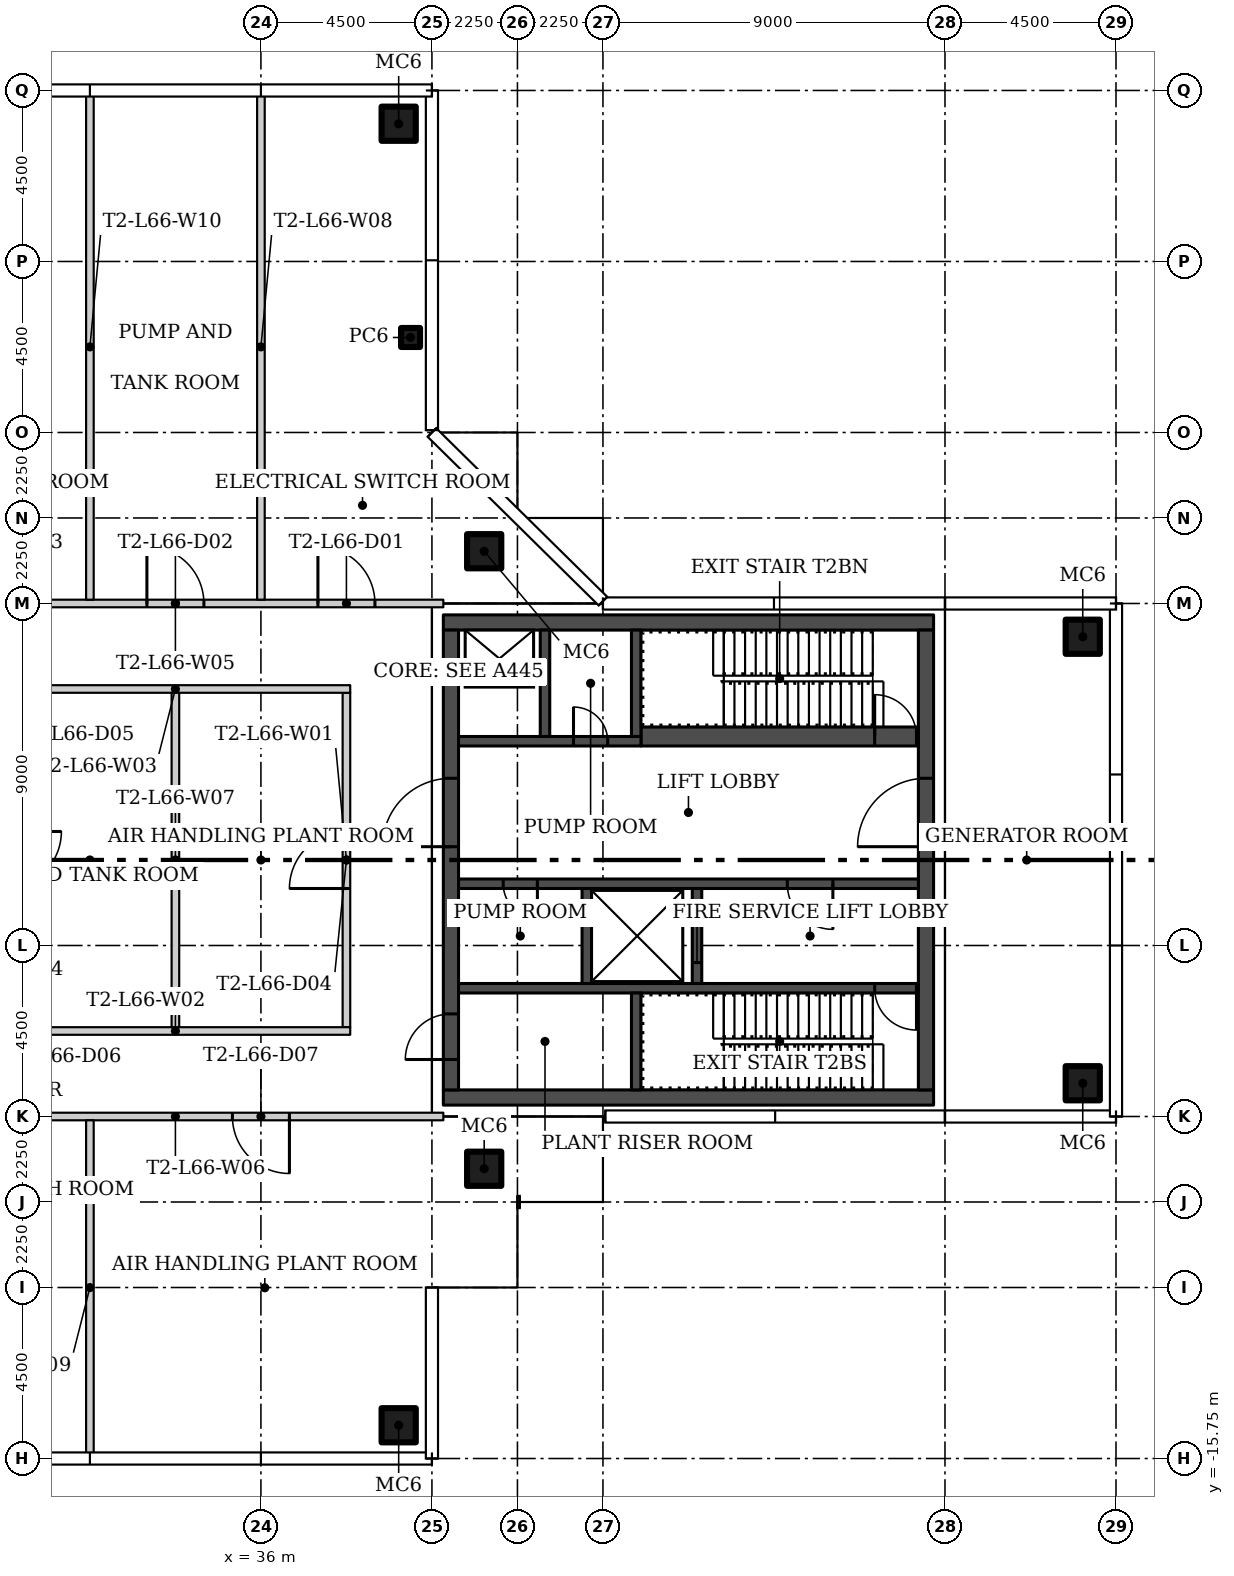
"""IFC4 building model, lengths in metres.
Left out: names, types, materials, properties, quantities, classifications, styles, units other than length and angle.
Written with IfcOpenShell. Run it as: python <this file> out.ifc"""

import sys

from ifc_helpers import new_model, si_unit, direction, frame, frame_2d, origin, origin_2d, place, context, subcontext, project, spatial, rectangle, hollow_rectangle, extrude, element, fill, save


model = new_model("IFC4")
c1 = context("Model", 3, precision=1e-05, world=origin(), true_north=direction((0.0, 1.0)))
c2 = subcontext(c1, "Body", "Model", "MODEL_VIEW")
j1 = project(units=[si_unit("LENGTHUNIT", "METRE"), si_unit("PLANEANGLEUNIT", "RADIAN")], contexts=[c1])
p1 = place(None, origin())
s1 = spatial("IfcSite", under=j1, at=p1, CompositionType="ELEMENT")
p2 = place(p1, origin())
s2 = spatial("IfcBuilding", under=s1, at=p2, CompositionType="ELEMENT")
p3 = place(p2, frame((0.0, 0.0, 273.3)))
s3 = spatial("IfcBuildingStorey", under=s2, at=p3, CompositionType="ELEMENT", Elevation=273.3)
for number, where in (
    (1, (41.875, 8.125, 0.0)),
    (2, (41.875, -8.125, 0.0)),
):
    element("IfcColumn", number, at=place(p3, frame(where)), inside=s3, PredefinedType="COLUMN", context=c2, shape_type="SweptSolid", body=[
        extrude(hollow_rectangle(XDim=0.9, YDim=0.9, WallThickness=0.036, at=origin_2d()), origin(), (0.0, 0.0, 1.0), 4.55),
    ])
p4 = place(p3, frame((39.938, 13.75, 0.0)))
e3 = element("IfcColumn", 3, at=p4, inside=s3, PredefinedType="COLUMN", context=c2, shape_type="SweptSolid", body=[
    extrude(hollow_rectangle(XDim=0.5, YDim=0.5, WallThickness=0.016, at=origin_2d()), origin(), (0.0, 0.0, 1.0), 4.55),
])
for number, where in (
    (4, (39.625, 19.375, 0.0)),
    (5, (39.625, -14.875, 0.0)),
    (6, (57.625, -5.875, 0.0)),
    (7, (57.625, 5.875, 0.0)),
):
    element("IfcColumn", number, at=place(p3, frame(where)), inside=s3, PredefinedType="COLUMN", context=c2, shape_type="SweptSolid", body=[
        extrude(hollow_rectangle(XDim=0.9, YDim=0.9, WallThickness=0.036, at=origin_2d()), origin(), (0.0, 0.0, 1.0), 4.55),
    ])
p5 = place(p3, frame((38.25, -4.4, 0.0), z_axis=(0.0, 0.0, 1.0), x_axis=(0.0, 1.0, 0.0)))
e8 = element("IfcWall", 8, at=p5, inside=s3, PredefinedType="PARTITIONING", context=c2, shape_type="SweptSolid", body=[
    extrude(rectangle(XDim=8.8, YDim=0.2, at=frame_2d((4.4, 0.0))), origin(), (0.0, 0.0, 1.0), 4.55),
])
p6 = place(p5, frame((3.65, 0.0, 0.0)))
e9 = element("IfcOpeningElement", 9, at=p6, cuts=e8, PredefinedType="OPENING", context=c2, shape_type="SweptSolid", body=[
    extrude(rectangle(XDim=1.5, YDim=2.4, at=frame_2d((0.75, 1.2))), frame((0.0, 0.11, 0.0), z_axis=(0.0, -1.0, 0.0), x_axis=(1.0, 0.0, 0.0)), (0.0, 0.0, 1.0), 0.22),
])
p7 = place(p3, frame((29.15, -4.5, 0.0)))
e10 = element("IfcWall", 10, at=p7, inside=s3, PredefinedType="PARTITIONING", context=c2, shape_type="SweptSolid", body=[
    extrude(rectangle(XDim=9.2, YDim=0.2, at=frame_2d((4.6, 0.0))), origin(), (0.0, 0.0, 1.0), 4.55),
])
p8 = place(p3, frame((38.35, 4.5, 0.0), z_axis=(0.0, 0.0, 1.0), x_axis=(-1.0, 0.0, 0.0)))
e11 = element("IfcWall", 11, at=p8, inside=s3, PredefinedType="PARTITIONING", context=c2, shape_type="SweptSolid", body=[
    extrude(rectangle(XDim=9.2, YDim=0.2, at=frame_2d((4.6, 0.0))), origin(), (0.0, 0.0, 1.0), 4.55),
])
p9 = place(p3, frame((26.7, 6.75, 0.0)))
e12 = element("IfcWall", 12, at=p9, inside=s3, PredefinedType="PARTITIONING", context=c2, shape_type="SweptSolid", body=[
    extrude(rectangle(XDim=14.1, YDim=0.2, at=frame_2d((7.05, 0.0))), origin(), (0.0, 0.0, 1.0), 4.55),
])
p10 = place(p9, frame((10.8, 0.0, 0.0)))
e13 = element("IfcOpeningElement", 13, at=p10, cuts=e12, PredefinedType="OPENING", context=c2, shape_type="SweptSolid", body=[
    extrude(rectangle(XDim=1.5, YDim=2.4, at=frame_2d((0.75, 1.2))), frame((0.0, 0.11, 0.0), z_axis=(0.0, -1.0, 0.0), x_axis=(1.0, 0.0, 0.0)), (0.0, 0.0, 1.0), 0.22),
])
p11 = place(p9, frame((6.3, 0.0, 0.0)))
e14 = element("IfcOpeningElement", 14, at=p11, cuts=e12, PredefinedType="OPENING", context=c2, shape_type="SweptSolid", body=[
    extrude(rectangle(XDim=1.5, YDim=2.4, at=frame_2d((0.75, 1.2))), frame((0.0, 0.11, 0.0), z_axis=(0.0, -1.0, 0.0), x_axis=(1.0, 0.0, 0.0)), (0.0, 0.0, 1.0), 0.22),
])
p12 = place(p9, frame((1.8, 0.0, 0.0)))
e15 = element("IfcOpeningElement", 15, at=p12, cuts=e12, PredefinedType="OPENING", context=c2, shape_type="SweptSolid", body=[
    extrude(rectangle(XDim=1.5, YDim=2.4, at=frame_2d((0.75, 1.2))), frame((0.0, 0.11, 0.0), z_axis=(0.0, -1.0, 0.0), x_axis=(1.0, 0.0, 0.0)), (0.0, 0.0, 1.0), 0.22),
])
p13 = place(p3, frame((40.8, -6.75, 0.0), z_axis=(0.0, 0.0, 1.0), x_axis=(-1.0, 0.0, 0.0)))
e16 = element("IfcWall", 16, at=p13, inside=s3, PredefinedType="PARTITIONING", context=c2, shape_type="SweptSolid", body=[
    extrude(rectangle(XDim=14.1, YDim=0.2, at=frame_2d((7.05, 0.0))), origin(), (0.0, 0.0, 1.0), 4.55),
])
p14 = place(p13, frame((10.8, 0.0, 0.0)))
e17 = element("IfcOpeningElement", 17, at=p14, cuts=e16, PredefinedType="OPENING", context=c2, shape_type="SweptSolid", body=[
    extrude(rectangle(XDim=1.5, YDim=2.4, at=frame_2d((0.75, 1.2))), frame((0.0, 0.11, 0.0), z_axis=(0.0, -1.0, 0.0), x_axis=(1.0, 0.0, 0.0)), (0.0, 0.0, 1.0), 0.22),
])
p15 = place(p13, frame((4.05, 0.0, 0.0)))
e18 = element("IfcOpeningElement", 18, at=p15, cuts=e16, PredefinedType="OPENING", context=c2, shape_type="SweptSolid", body=[
    extrude(rectangle(XDim=1.5, YDim=2.4, at=frame_2d((0.75, 1.2))), frame((0.0, 0.11, 0.0), z_axis=(0.0, -1.0, 0.0), x_axis=(1.0, 0.0, 0.0)), (0.0, 0.0, 1.0), 0.22),
])
p16 = place(p3, frame((33.75, 4.4, 0.0), z_axis=(0.0, 0.0, 1.0), x_axis=(0.0, -1.0, 0.0)))
e19 = element("IfcWall", 19, at=p16, inside=s3, PredefinedType="PARTITIONING", context=c2, shape_type="SweptSolid", body=[
    extrude(rectangle(XDim=8.8, YDim=0.2, at=frame_2d((4.4, 0.0))), origin(), (0.0, 0.0, 1.0), 4.55),
])
p17 = place(p3, frame((36.0, 20.155, 0.0), z_axis=(0.0, 0.0, 1.0), x_axis=(0.0, -1.0, 0.0)))
e20 = element("IfcWall", 20, at=p17, inside=s3, PredefinedType="PARTITIONING", context=c2, shape_type="SweptSolid", body=[
    extrude(rectangle(XDim=13.305, YDim=0.2, at=frame_2d((6.652, 0.0))), origin(), (0.0, 0.0, 1.0), 4.55),
])
p18 = place(p3, frame((31.5, -6.85, 0.0), z_axis=(0.0, 0.0, 1.0), x_axis=(0.0, -1.0, 0.0)))
e21 = element("IfcWall", 21, at=p18, inside=s3, PredefinedType="PARTITIONING", context=c2, shape_type="SweptSolid", body=[
    extrude(rectangle(XDim=8.805, YDim=0.2, at=frame_2d((4.402, 0.0))), origin(), (0.0, 0.0, 1.0), 4.55),
])
p19 = place(p3, frame((31.5, 20.155, 0.0), z_axis=(0.0, 0.0, 1.0), x_axis=(0.0, -1.0, 0.0)))
e22 = element("IfcWall", 22, at=p19, inside=s3, PredefinedType="PARTITIONING", context=c2, shape_type="SweptSolid", body=[
    extrude(rectangle(XDim=13.305, YDim=0.2, at=frame_2d((6.652, 0.0))), origin(), (0.0, 0.0, 1.0), 4.55),
])
for number, where, z_axis, x_axis in (
    (23, (53.7, -6.25, 0.0), (0.0, 0.0, 1.0), (-1.0, 0.0, 0.0)),
    (24, (53.7, 6.25, 0.0), (0.0, 0.0, 1.0), (-1.0, 0.0, 0.0)),
):
    element("IfcWall", number, at=place(p3, frame(where, z_axis=z_axis, x_axis=x_axis)), inside=s3, PredefinedType="SHEAR", context=c2, shape_type="SweptSolid", body=[
        extrude(rectangle(XDim=12.9, YDim=0.4, at=frame_2d((6.45, 0.0))), origin(), (0.0, 0.0, 1.0), 4.55),
    ])
p20 = place(p3, frame((53.5, -6.05, 0.0), z_axis=(0.0, 0.0, 1.0), x_axis=(0.0, 1.0, 0.0)))
e25 = element("IfcWall", 25, at=p20, inside=s3, PredefinedType="SHEAR", context=c2, shape_type="SweptSolid", body=[
    extrude(rectangle(XDim=12.1, YDim=0.4, at=frame_2d((6.05, 0.0))), origin(), (0.0, 0.0, 1.0), 4.55),
])
p21 = place(p20, frame((6.4, 0.0, 0.0)))
e26 = element("IfcOpeningElement", 26, at=p21, cuts=e25, PredefinedType="OPENING", context=c2, shape_type="SweptSolid", body=[
    extrude(rectangle(XDim=1.8, YDim=2.4, at=frame_2d((0.9, 1.2))), frame((0.0, 0.21, 0.0), z_axis=(0.0, -1.0, 0.0), x_axis=(1.0, 0.0, 0.0)), (0.0, 0.0, 1.0), 0.42),
])
p22 = place(p3, frame((41.0, -6.05, 0.0), z_axis=(0.0, 0.0, 1.0), x_axis=(0.0, 1.0, 0.0)))
e27 = element("IfcWall", 27, at=p22, inside=s3, PredefinedType="SHEAR", context=c2, shape_type="SweptSolid", body=[
    extrude(rectangle(XDim=12.1, YDim=0.4, at=frame_2d((6.05, 0.0))), origin(), (0.0, 0.0, 1.0), 4.55),
])
p23 = place(p22, frame((0.8, 0.0, 0.0)))
e28 = element("IfcOpeningElement", 28, at=p23, cuts=e27, PredefinedType="OPENING", context=c2, shape_type="SweptSolid", body=[
    extrude(rectangle(XDim=1.2, YDim=2.1, at=frame_2d((0.6, 1.05))), frame((0.0, 0.21, 0.0), z_axis=(0.0, -1.0, 0.0), x_axis=(1.0, 0.0, 0.0)), (0.0, 0.0, 1.0), 0.42),
])
p24 = place(p22, frame((6.4, 0.0, 0.0)))
e29 = element("IfcOpeningElement", 29, at=p24, cuts=e27, PredefinedType="OPENING", context=c2, shape_type="SweptSolid", body=[
    extrude(rectangle(XDim=1.8, YDim=2.4, at=frame_2d((0.9, 1.2))), frame((0.0, 0.21, 0.0), z_axis=(0.0, -1.0, 0.0), x_axis=(1.0, 0.0, 0.0)), (0.0, 0.0, 1.0), 0.42),
])
p25 = place(p3, frame((53.3, -3.375, 0.0), z_axis=(0.0, 0.0, 1.0), x_axis=(-1.0, 0.0, 0.0)))
e30 = element("IfcWall", 30, at=p25, inside=s3, PredefinedType="SHEAR", context=c2, shape_type="SweptSolid", body=[
    extrude(rectangle(XDim=12.1, YDim=0.25, at=frame_2d((6.05, 0.0))), origin(), (0.0, 0.0, 1.0), 4.55),
])
p26 = place(p25, frame((0.05, 0.0, 0.0)))
e31 = element("IfcOpeningElement", 31, at=p26, cuts=e30, PredefinedType="OPENING", context=c2, shape_type="SweptSolid", body=[
    extrude(rectangle(XDim=1.1, YDim=2.1, at=frame_2d((0.55, 1.05))), frame((0.0, 0.135, 0.0), z_axis=(0.0, -1.0, 0.0), x_axis=(1.0, 0.0, 0.0)), (0.0, 0.0, 1.0), 0.27),
])
p27 = place(p3, frame((45.875, -6.05, 0.0), z_axis=(0.0, 0.0, 1.0), x_axis=(0.0, 1.0, 0.0)))
e32 = element("IfcWall", 32, at=p27, inside=s3, PredefinedType="SHEAR", context=c2, shape_type="SweptSolid", body=[
    extrude(rectangle(XDim=2.55, YDim=0.25, at=frame_2d((1.275, 0.0))), origin(), (0.0, 0.0, 1.0), 4.55),
])
p28 = place(p3, frame((53.3, -0.625, 0.0), z_axis=(0.0, 0.0, 1.0), x_axis=(-1.0, 0.0, 0.0)))
e33 = element("IfcWall", 33, at=p28, inside=s3, PredefinedType="SHEAR", context=c2, shape_type="SweptSolid", body=[
    extrude(rectangle(XDim=12.1, YDim=0.25, at=frame_2d((6.05, 0.0))), origin(), (0.0, 0.0, 1.0), 4.55),
])
p29 = place(p28, frame((2.25, 0.0, 0.0)))
e34 = element("IfcOpeningElement", 34, at=p29, cuts=e33, PredefinedType="OPENING", context=c2, shape_type="SweptSolid", body=[
    extrude(rectangle(XDim=1.2, YDim=2.1, at=frame_2d((0.6, 1.05))), frame((0.0, 0.135, 0.0), z_axis=(0.0, -1.0, 0.0), x_axis=(1.0, 0.0, 0.0)), (0.0, 0.0, 1.0), 0.27),
])
p30 = place(p28, frame((10.025, 0.0, 0.0)))
e35 = element("IfcOpeningElement", 35, at=p30, cuts=e33, PredefinedType="OPENING", context=c2, shape_type="SweptSolid", body=[
    extrude(rectangle(XDim=0.9, YDim=2.1, at=frame_2d((0.45, 1.05))), frame((0.0, 0.135, 0.0), z_axis=(0.0, -1.0, 0.0), x_axis=(1.0, 0.0, 0.0)), (0.0, 0.0, 1.0), 0.27),
])
p31 = place(p3, frame((47.475, -3.25, 0.0), z_axis=(0.0, 0.0, 1.0), x_axis=(0.0, 1.0, 0.0)))
e36 = element("IfcWall", 36, at=p31, inside=s3, PredefinedType="SHEAR", context=c2, shape_type="SweptSolid", body=[
    extrude(rectangle(XDim=2.5, YDim=0.25, at=frame_2d((1.25, 0.0))), origin(), (0.0, 0.0, 1.0), 4.55),
])
p32 = place(p31, frame((0.55, 0.0, 0.0)))
e37 = element("IfcOpeningElement", 37, at=p32, cuts=e36, PredefinedType="OPENING", context=c2, shape_type="SweptSolid", body=[
    extrude(rectangle(XDim=1.4, YDim=2.4, at=frame_2d((0.7, 1.2))), frame((0.0, 0.135, 0.0), z_axis=(0.0, -1.0, 0.0), x_axis=(1.0, 0.0, 0.0)), (0.0, 0.0, 1.0), 0.27),
])
p33 = place(p3, frame((44.575, -3.25, 0.0), z_axis=(0.0, 0.0, 1.0), x_axis=(0.0, 1.0, 0.0)))
e38 = element("IfcWall", 38, at=p33, inside=s3, PredefinedType="SHEAR", context=c2, shape_type="SweptSolid", body=[
    extrude(rectangle(XDim=2.5, YDim=0.25, at=frame_2d((1.25, 0.0))), origin(), (0.0, 0.0, 1.0), 4.55),
])
p34 = place(p3, frame((46.0, 3.25, 0.0)))
e39 = element("IfcWall", 39, at=p34, inside=s3, PredefinedType="SHEAR", context=c2, shape_type="SweptSolid", body=[
    extrude(rectangle(XDim=7.3, YDim=0.5, at=frame_2d((3.65, 0.0))), origin(), (0.0, 0.0, 1.0), 4.55),
])
p35 = place(p34, frame((6.15, 0.0, 0.0)))
e40 = element("IfcOpeningElement", 40, at=p35, cuts=e39, PredefinedType="OPENING", context=c2, shape_type="SweptSolid", body=[
    extrude(rectangle(XDim=1.1, YDim=2.1, at=frame_2d((0.55, 1.05))), frame((0.0, 0.26, 0.0), z_axis=(0.0, -1.0, 0.0), x_axis=(1.0, 0.0, 0.0)), (0.0, 0.0, 1.0), 0.52),
])
p36 = place(p3, frame((41.2, 3.125, 0.0)))
e41 = element("IfcWall", 41, at=p36, inside=s3, PredefinedType="SHEAR", context=c2, shape_type="SweptSolid", body=[
    extrude(rectangle(XDim=4.8, YDim=0.25, at=frame_2d((2.4, 0.0))), origin(), (0.0, 0.0, 1.0), 4.55),
])
p37 = place(p36, frame((3.025, 0.0, 0.0)))
e42 = element("IfcOpeningElement", 42, at=p37, cuts=e41, PredefinedType="OPENING", context=c2, shape_type="SweptSolid", body=[
    extrude(rectangle(XDim=0.9, YDim=2.1, at=frame_2d((0.45, 1.05))), frame((0.0, 0.135, 0.0), z_axis=(0.0, -1.0, 0.0), x_axis=(1.0, 0.0, 0.0)), (0.0, 0.0, 1.0), 0.27),
])
for number, where, z_axis, x_axis in (
    (43, (45.875, 3.25, 0.0), (0.0, 0.0, 1.0), (0.0, 1.0, 0.0)),
    (44, (43.475, 3.25, 0.0), (0.0, 0.0, 1.0), (0.0, 1.0, 0.0)),
):
    element("IfcWall", number, at=place(p3, frame(where, z_axis=z_axis, x_axis=x_axis)), inside=s3, PredefinedType="SHEAR", context=c2, shape_type="SweptSolid", body=[
        extrude(rectangle(XDim=2.8, YDim=0.25, at=frame_2d((1.4, 0.0))), origin(), (0.0, 0.0, 1.0), 4.55),
    ])
p38 = place(p10, origin())
e45 = element("IfcDoor", 45, at=p38, inside=s3, OperationType="DOUBLE_DOOR_SINGLE_SWING", PredefinedType="DOOR", context=c2, shape_type="SweptSolid", body=[
    extrude(rectangle(XDim=1.5, YDim=2.4, at=frame_2d((0.75, 1.2))), frame((0.0, 0.025, 0.0), z_axis=(0.0, -1.0, 0.0), x_axis=(1.0, 0.0, 0.0)), (0.0, 0.0, 1.0), 0.05),
])
fill(e13, e45)
p39 = place(p11, origin())
e46 = element("IfcDoor", 46, at=p39, inside=s3, OperationType="DOUBLE_DOOR_SINGLE_SWING", PredefinedType="DOOR", context=c2, shape_type="SweptSolid", body=[
    extrude(rectangle(XDim=1.5, YDim=2.4, at=frame_2d((0.75, 1.2))), frame((0.0, 0.025, 0.0), z_axis=(0.0, -1.0, 0.0), x_axis=(1.0, 0.0, 0.0)), (0.0, 0.0, 1.0), 0.05),
])
fill(e14, e46)
p40 = place(p6, origin())
e47 = element("IfcDoor", 47, at=p40, inside=s3, OperationType="DOUBLE_DOOR_SINGLE_SWING", PredefinedType="DOOR", context=c2, shape_type="SweptSolid", body=[
    extrude(rectangle(XDim=1.5, YDim=2.4, at=frame_2d((0.75, 1.2))), frame((0.0, 0.025, 0.0), z_axis=(0.0, -1.0, 0.0), x_axis=(1.0, 0.0, 0.0)), (0.0, 0.0, 1.0), 0.05),
])
fill(e9, e47)
p41 = place(p15, origin())
e48 = element("IfcDoor", 48, at=p41, inside=s3, OperationType="DOUBLE_DOOR_SINGLE_SWING", PredefinedType="DOOR", context=c2, shape_type="SweptSolid", body=[
    extrude(rectangle(XDim=1.5, YDim=2.4, at=frame_2d((0.75, 1.2))), frame((0.0, 0.025, 0.0), z_axis=(0.0, -1.0, 0.0), x_axis=(1.0, 0.0, 0.0)), (0.0, 0.0, 1.0), 0.05),
])
fill(e18, e48)
p42 = place(p21, origin())
e49 = element("IfcDoor", 49, at=p42, inside=s3, OperationType="DOUBLE_DOOR_SINGLE_SWING", PredefinedType="DOOR", context=c2, shape_type="SweptSolid", body=[
    extrude(rectangle(XDim=1.8, YDim=2.4, at=frame_2d((0.9, 1.2))), frame((0.0, 0.025, 0.0), z_axis=(0.0, -1.0, 0.0), x_axis=(1.0, 0.0, 0.0)), (0.0, 0.0, 1.0), 0.05),
])
fill(e26, e49)
p43 = place(p23, origin())
e50 = element("IfcDoor", 50, at=p43, inside=s3, OperationType="SINGLE_SWING_LEFT", PredefinedType="DOOR", context=c2, shape_type="SweptSolid", body=[
    extrude(rectangle(XDim=1.2, YDim=2.1, at=frame_2d((0.6, 1.05))), frame((0.0, 0.025, 0.0), z_axis=(0.0, -1.0, 0.0), x_axis=(1.0, 0.0, 0.0)), (0.0, 0.0, 1.0), 0.05),
])
fill(e28, e50)
p44 = place(p24, origin())
e51 = element("IfcDoor", 51, at=p44, inside=s3, OperationType="DOUBLE_DOOR_SINGLE_SWING", PredefinedType="DOOR", context=c2, shape_type="SweptSolid", body=[
    extrude(rectangle(XDim=1.8, YDim=2.4, at=frame_2d((0.9, 1.2))), frame((0.0, 0.025, 0.0), z_axis=(0.0, -1.0, 0.0), x_axis=(1.0, 0.0, 0.0)), (0.0, 0.0, 1.0), 0.05),
])
fill(e29, e51)
p45 = place(p26, origin())
e52 = element("IfcDoor", 52, at=p45, inside=s3, OperationType="SINGLE_SWING_LEFT", PredefinedType="DOOR", context=c2, shape_type="SweptSolid", body=[
    extrude(rectangle(XDim=1.1, YDim=2.1, at=frame_2d((0.55, 1.05))), frame((0.0, 0.025, 0.0), z_axis=(0.0, -1.0, 0.0), x_axis=(1.0, 0.0, 0.0)), (0.0, 0.0, 1.0), 0.05),
])
fill(e31, e52)
p46 = place(p29, origin())
e53 = element("IfcDoor", 53, at=p46, inside=s3, OperationType="SINGLE_SWING_LEFT", PredefinedType="DOOR", context=c2, shape_type="SweptSolid", body=[
    extrude(rectangle(XDim=1.2, YDim=2.1, at=frame_2d((0.6, 1.05))), frame((0.0, 0.025, 0.0), z_axis=(0.0, -1.0, 0.0), x_axis=(1.0, 0.0, 0.0)), (0.0, 0.0, 1.0), 0.05),
])
fill(e34, e53)
p47 = place(p30, origin())
e54 = element("IfcDoor", 54, at=p47, inside=s3, OperationType="SINGLE_SWING_RIGHT", PredefinedType="DOOR", context=c2, shape_type="SweptSolid", body=[
    extrude(rectangle(XDim=0.9, YDim=2.1, at=frame_2d((0.45, 1.05))), frame((0.0, 0.025, 0.0), z_axis=(0.0, -1.0, 0.0), x_axis=(1.0, 0.0, 0.0)), (0.0, 0.0, 1.0), 0.05),
])
fill(e35, e54)
p48 = place(p32, origin())
e55 = element("IfcDoor", 55, at=p48, inside=s3, OperationType="SLIDING_TO_LEFT", PredefinedType="DOOR", context=c2, shape_type="SweptSolid", body=[
    extrude(rectangle(XDim=1.4, YDim=2.4, at=frame_2d((0.7, 1.2))), frame((0.0, 0.025, 0.0), z_axis=(0.0, -1.0, 0.0), x_axis=(1.0, 0.0, 0.0)), (0.0, 0.0, 1.0), 0.05),
])
fill(e37, e55)
p49 = place(p35, origin())
e56 = element("IfcDoor", 56, at=p49, inside=s3, OperationType="SINGLE_SWING_RIGHT", PredefinedType="DOOR", context=c2, shape_type="SweptSolid", body=[
    extrude(rectangle(XDim=1.1, YDim=2.1, at=frame_2d((0.55, 1.05))), frame((0.0, 0.025, 0.0), z_axis=(0.0, -1.0, 0.0), x_axis=(1.0, 0.0, 0.0)), (0.0, 0.0, 1.0), 0.05),
])
fill(e40, e56)
p50 = place(p37, origin())
e57 = element("IfcDoor", 57, at=p50, inside=s3, OperationType="SINGLE_SWING_RIGHT", PredefinedType="DOOR", context=c2, shape_type="SweptSolid", body=[
    extrude(rectangle(XDim=0.9, YDim=2.1, at=frame_2d((0.45, 1.05))), frame((0.0, 0.025, 0.0), z_axis=(0.0, -1.0, 0.0), x_axis=(1.0, 0.0, 0.0)), (0.0, 0.0, 1.0), 0.05),
])
fill(e42, e57)
save(model, sys.argv[1])
